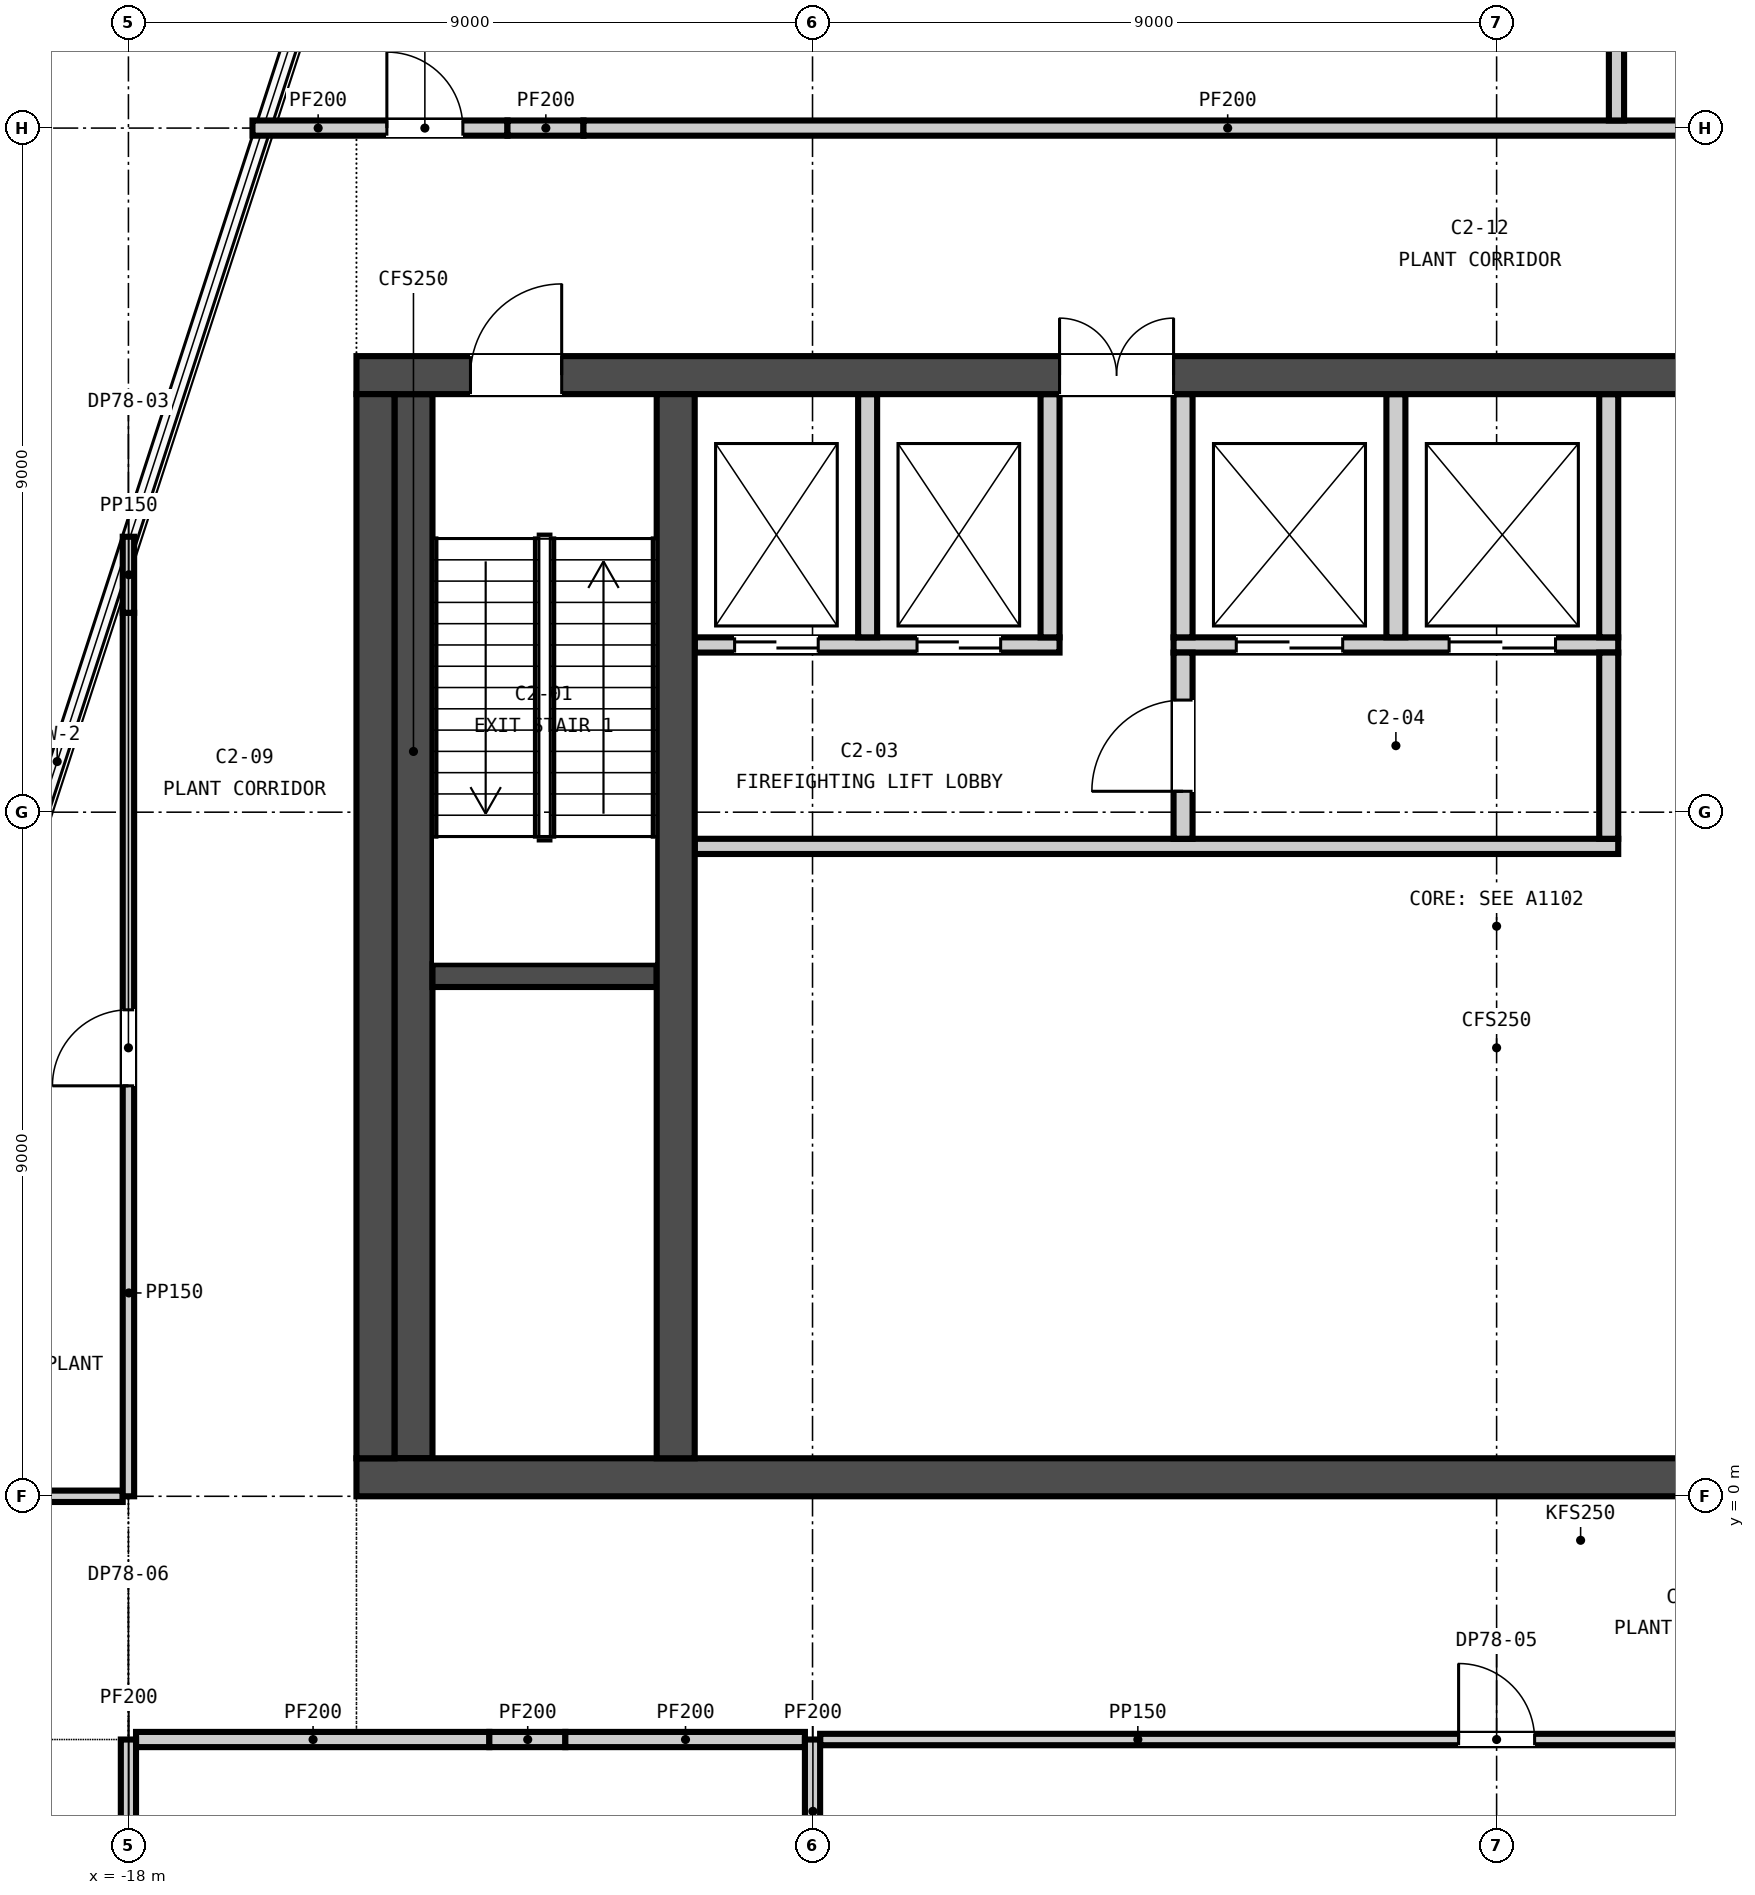
"""IFC4 building model, lengths in metres.
Left out: names, types, materials, properties, quantities, classifications, styles, units other than length and angle.
Written with IfcOpenShell. Run it as: python <this file> out.ifc"""

import sys

from ifc_helpers import new_model, si_unit, direction, frame, frame_2d, origin, place, context, subcontext, project, spatial, rectangle, extrude, element, fill, save


model = new_model("IFC4")
c1 = context("Model", 3, precision=1e-05, world=origin(), true_north=direction((0.0, 1.0)))
c2 = subcontext(c1, "Body", "Model", "MODEL_VIEW")
j1 = project(units=[si_unit("LENGTHUNIT", "METRE"), si_unit("PLANEANGLEUNIT", "RADIAN")], contexts=[c1])
p1 = place(None, origin())
s1 = spatial("IfcSite", under=j1, at=p1, CompositionType="ELEMENT")
p2 = place(p1, origin())
s2 = spatial("IfcBuilding", under=s1, at=p2, CompositionType="ELEMENT")
p3 = place(p2, frame((0.0, 0.0, 306.1)))
s3 = spatial("IfcBuildingStorey", under=s2, at=p3, CompositionType="ELEMENT", Elevation=306.1)
p4 = place(p3, frame((-15.0, 0.25, -0.25), z_axis=(0.0, 0.0, 1.0), x_axis=(1.0, 0.0, 0.0)))
e1 = element("IfcWall", 1, at=p4, inside=s3, PredefinedType="SOLIDWALL", context=c2, shape_type="SweptSolid", body=[
    extrude(rectangle(XDim=30.0, YDim=0.5, at=frame_2d((15.0, 0.0))), origin(), (0.0, 0.0, 1.0), 5.0),
])
p5 = place(p3, frame((-15.0, 14.75, -0.25), z_axis=(0.0, 0.0, 1.0), x_axis=(1.0, 0.0, 0.0)))
e2 = element("IfcWall", 2, at=p5, inside=s3, PredefinedType="SOLIDWALL", context=c2, shape_type="SweptSolid", body=[
    extrude(rectangle(XDim=30.0, YDim=0.5, at=frame_2d((15.0, 0.0))), origin(), (0.0, 0.0, 1.0), 5.0),
])
p6 = place(p5, frame((1.5, 0.0, 0.25)))
e3 = element("IfcOpeningElement", 3, at=p6, cuts=e2, PredefinedType="OPENING", context=c2, shape_type="SweptSolid", body=[
    extrude(rectangle(XDim=1.2, YDim=2.1, at=frame_2d((0.6, 1.05))), frame((0.0, 0.26, 0.0), z_axis=(0.0, -1.0, 0.0), x_axis=(1.0, 0.0, 0.0)), (0.0, 0.0, 1.0), 0.52),
])
p7 = place(p5, frame((27.3, 0.0, 0.25)))
e4 = element("IfcOpeningElement", 4, at=p7, cuts=e2, PredefinedType="OPENING", context=c2, shape_type="SweptSolid", body=[
    extrude(rectangle(XDim=1.2, YDim=2.1, at=frame_2d((0.6, 1.05))), frame((0.0, 0.26, 0.0), z_axis=(0.0, -1.0, 0.0), x_axis=(1.0, 0.0, 0.0)), (0.0, 0.0, 1.0), 0.52),
])
p8 = place(p5, frame((9.25, 0.0, 0.25)))
e5 = element("IfcOpeningElement", 5, at=p8, cuts=e2, PredefinedType="OPENING", context=c2, shape_type="SweptSolid", body=[
    extrude(rectangle(XDim=1.5, YDim=2.1, at=frame_2d((0.75, 1.05))), frame((0.0, 0.26, 0.0), z_axis=(0.0, -1.0, 0.0), x_axis=(1.0, 0.0, 0.0)), (0.0, 0.0, 1.0), 0.52),
])
for number, where, z_axis, x_axis in (
    (6, (-14.75, 0.5, -0.25), (0.0, 0.0, 1.0), (0.0, 1.0, 0.0)),
    (7, (-10.8, 0.5, -0.25), (0.0, 0.0, 1.0), (0.0, 1.0, 0.0)),
):
    element("IfcWall", number, at=place(p3, frame(where, z_axis=z_axis, x_axis=x_axis)), inside=s3, PredefinedType="SOLIDWALL", context=c2, shape_type="SweptSolid", body=[
        extrude(rectangle(XDim=14.0, YDim=0.5, at=frame_2d((7.0, 0.0))), origin(), (0.0, 0.0, 1.0), 5.0),
    ])
p9 = place(p3, frame((-14.0, 6.85, 0.0), z_axis=(0.0, 0.0, 1.0), x_axis=(1.0, 0.0, 0.0)))
e8 = element("IfcWall", 8, at=p9, inside=s3, PredefinedType="SOLIDWALL", context=c2, shape_type="SweptSolid", body=[
    extrude(rectangle(XDim=2.95, YDim=0.3, at=frame_2d((1.475, 0.0))), origin(), (0.0, 0.0, 1.0), 4.75),
])
p10 = place(p3, frame((-14.25, 0.5, 0.0), z_axis=(0.0, 0.0, 1.0), x_axis=(0.0, 1.0, 0.0)))
e9 = element("IfcWall", 9, at=p10, inside=s3, PredefinedType="SOLIDWALL", context=c2, shape_type="SweptSolid", body=[
    extrude(rectangle(XDim=14.0, YDim=0.5, at=frame_2d((7.0, 0.0))), origin(), (0.0, 0.0, 1.0), 4.75),
])
p11 = place(p3, frame((-10.55, 8.55, 0.0), z_axis=(0.0, 0.0, 1.0), x_axis=(1.0, 0.0, 0.0)))
e10 = element("IfcWall", 10, at=p11, inside=s3, PredefinedType="PARTITIONING", context=c2, shape_type="SweptSolid", body=[
    extrude(rectangle(XDim=12.15, YDim=0.2, at=frame_2d((6.075, 0.0))), origin(), (0.0, 0.0, 1.0), 4.75),
])
p12 = place(p3, frame((-10.55, 11.2, 0.0), z_axis=(0.0, 0.0, 1.0), x_axis=(1.0, 0.0, 0.0)))
e11 = element("IfcWall", 11, at=p12, inside=s3, PredefinedType="PARTITIONING", context=c2, shape_type="SweptSolid", body=[
    extrude(rectangle(XDim=4.8, YDim=0.2, at=frame_2d((2.4, 0.0))), origin(), (0.0, 0.0, 1.0), 4.75),
])
p13 = place(p12, frame((0.525, 0.0, 0.0)))
e12 = element("IfcOpeningElement", 12, at=p13, cuts=e11, PredefinedType="OPENING", context=c2, shape_type="SweptSolid", body=[
    extrude(rectangle(XDim=1.1, YDim=2.1, at=frame_2d((0.55, 1.05))), frame((0.0, 0.11, 0.0), z_axis=(0.0, -1.0, 0.0), x_axis=(1.0, 0.0, 0.0)), (0.0, 0.0, 1.0), 0.22),
])
p14 = place(p12, frame((2.925, 0.0, 0.0)))
e13 = element("IfcOpeningElement", 13, at=p14, cuts=e11, PredefinedType="OPENING", context=c2, shape_type="SweptSolid", body=[
    extrude(rectangle(XDim=1.1, YDim=2.1, at=frame_2d((0.55, 1.05))), frame((0.0, 0.11, 0.0), z_axis=(0.0, -1.0, 0.0), x_axis=(1.0, 0.0, 0.0)), (0.0, 0.0, 1.0), 0.22),
])
p15 = place(p3, frame((-4.25, 11.2, 0.0), z_axis=(0.0, 0.0, 1.0), x_axis=(1.0, 0.0, 0.0)))
e14 = element("IfcWall", 14, at=p15, inside=s3, PredefinedType="PARTITIONING", context=c2, shape_type="SweptSolid", body=[
    extrude(rectangle(XDim=5.85, YDim=0.2, at=frame_2d((2.925, 0.0))), origin(), (0.0, 0.0, 1.0), 4.75),
])
p16 = place(p15, frame((0.825, 0.0, 0.0)))
e15 = element("IfcOpeningElement", 15, at=p16, cuts=e14, PredefinedType="OPENING", context=c2, shape_type="SweptSolid", body=[
    extrude(rectangle(XDim=1.4, YDim=2.1, at=frame_2d((0.7, 1.05))), frame((0.0, 0.11, 0.0), z_axis=(0.0, -1.0, 0.0), x_axis=(1.0, 0.0, 0.0)), (0.0, 0.0, 1.0), 0.22),
])
p17 = place(p15, frame((3.625, 0.0, 0.0)))
e16 = element("IfcOpeningElement", 16, at=p17, cuts=e14, PredefinedType="OPENING", context=c2, shape_type="SweptSolid", body=[
    extrude(rectangle(XDim=1.4, YDim=2.1, at=frame_2d((0.7, 1.05))), frame((0.0, 0.11, 0.0), z_axis=(0.0, -1.0, 0.0), x_axis=(1.0, 0.0, 0.0)), (0.0, 0.0, 1.0), 0.22),
])
p18 = place(p3, frame((-4.125, 8.65, 0.0), z_axis=(0.0, 0.0, 1.0), x_axis=(0.0, 1.0, 0.0)))
e17 = element("IfcWall", 17, at=p18, inside=s3, PredefinedType="PARTITIONING", context=c2, shape_type="SweptSolid", body=[
    extrude(rectangle(XDim=2.45, YDim=0.25, at=frame_2d((1.225, 0.0))), origin(), (0.0, 0.0, 1.0), 4.75),
])
p19 = place(p18, frame((0.625, 0.0, 0.0)))
e18 = element("IfcOpeningElement", 18, at=p19, cuts=e17, PredefinedType="OPENING", context=c2, shape_type="SweptSolid", body=[
    extrude(rectangle(XDim=1.2, YDim=2.1, at=frame_2d((0.6, 1.05))), frame((0.0, 0.135, 0.0), z_axis=(0.0, -1.0, 0.0), x_axis=(1.0, 0.0, 0.0)), (0.0, 0.0, 1.0), 0.27),
])
p20 = place(p3, frame((1.475, 8.65, 0.0), z_axis=(0.0, 0.0, 1.0), x_axis=(0.0, 1.0, 0.0)))
e19 = element("IfcWall", 19, at=p20, inside=s3, PredefinedType="PARTITIONING", context=c2, shape_type="SweptSolid", body=[
    extrude(rectangle(XDim=2.45, YDim=0.25, at=frame_2d((1.225, 0.0))), origin(), (0.0, 0.0, 1.0), 4.75),
])
for number, where, z_axis, x_axis in (
    (20, (-8.275, 11.3, 0.0), (0.0, 0.0, 1.0), (0.0, 1.0, 0.0)),
    (21, (-5.875, 11.3, 0.0), (0.0, 0.0, 1.0), (0.0, 1.0, 0.0)),
    (22, (-4.125, 11.3, 0.0), (0.0, 0.0, 1.0), (0.0, 1.0, 0.0)),
    (23, (-1.325, 11.3, 0.0), (0.0, 0.0, 1.0), (0.0, 1.0, 0.0)),
    (24, (1.475, 11.3, 0.0), (0.0, 0.0, 1.0), (0.0, 1.0, 0.0)),
):
    element("IfcWall", number, at=place(p3, frame(where, z_axis=z_axis, x_axis=x_axis)), inside=s3, PredefinedType="PARTITIONING", context=c2, shape_type="SweptSolid", body=[
        extrude(rectangle(XDim=3.2, YDim=0.25, at=frame_2d((1.6, 0.0))), origin(), (0.0, 0.0, 1.0), 4.75),
    ])
p21 = place(p3, frame((-17.9, -3.2, 0.0), z_axis=(0.0, 0.0, 1.0), x_axis=(1.0, 0.0, 0.0)))
e25 = element("IfcWall", 25, at=p21, inside=s3, PredefinedType="PARTITIONING", context=c2, shape_type="SweptSolid", body=[
    extrude(rectangle(XDim=4.648, YDim=0.2, at=frame_2d((2.324, 0.0))), origin(), (0.0, 0.0, 1.0), 4.75),
])
p22 = place(p3, frame((-13.252, -3.2, 0.0), z_axis=(0.0, 0.0, 1.0), x_axis=(1.0, 0.0, 0.0)))
e26 = element("IfcWall", 26, at=p22, inside=s3, PredefinedType="PARTITIONING", context=c2, shape_type="SweptSolid", body=[
    extrude(rectangle(XDim=1.0, YDim=0.2, at=frame_2d((0.5, 0.0))), origin(), (0.0, 0.0, 1.0), 4.0),
])
p23 = place(p3, frame((-12.252, -3.2, 0.0), z_axis=(0.0, 0.0, 1.0), x_axis=(1.0, 0.0, 0.0)))
e27 = element("IfcWall", 27, at=p23, inside=s3, PredefinedType="PARTITIONING", context=c2, shape_type="SweptSolid", body=[
    extrude(rectangle(XDim=3.152, YDim=0.2, at=frame_2d((1.576, 0.0))), origin(), (0.0, 0.0, 1.0), 4.75),
])
p24 = place(p3, frame((-8.9, -3.2, 0.0), z_axis=(0.0, 0.0, 1.0), x_axis=(1.0, 0.0, 0.0)))
e28 = element("IfcWall", 28, at=p24, inside=s3, PredefinedType="PARTITIONING", context=c2, shape_type="SweptSolid", body=[
    extrude(rectangle(XDim=17.8, YDim=0.15, at=frame_2d((8.9, 0.0))), origin(), (0.0, 0.0, 1.0), 4.75),
])
p25 = place(p24, frame((8.4, 0.0, 0.0)))
e29 = element("IfcOpeningElement", 29, at=p25, cuts=e28, PredefinedType="OPENING", context=c2, shape_type="SweptSolid", body=[
    extrude(rectangle(XDim=1.0, YDim=2.1, at=frame_2d((0.5, 1.05))), frame((0.0, 0.085, 0.0), z_axis=(0.0, -1.0, 0.0), x_axis=(1.0, 0.0, 0.0)), (0.0, 0.0, 1.0), 0.17),
])
p26 = place(p3, frame((-22.216, 0.0, 0.0), z_axis=(0.0, 0.0, 1.0), x_axis=(1.0, 0.0, 0.0)))
e30 = element("IfcWall", 30, at=p26, inside=s3, PredefinedType="PARTITIONING", context=c2, shape_type="SweptSolid", body=[
    extrude(rectangle(XDim=4.141, YDim=0.15, at=frame_2d((2.071, 0.0))), origin(), (0.0, 0.0, 1.0), 4.75),
])
p27 = place(p3, frame((-16.368, 18.0, 0.0), z_axis=(0.0, 0.0, 1.0), x_axis=(1.0, 0.0, 0.0)))
e31 = element("IfcWall", 31, at=p27, inside=s3, PredefinedType="PARTITIONING", context=c2, shape_type="SweptSolid", body=[
    extrude(rectangle(XDim=3.354, YDim=0.2, at=frame_2d((1.677, 0.0))), origin(), (0.0, 0.0, 1.0), 4.75),
])
p28 = place(p27, frame((1.768, 0.0, 0.0)))
e32 = element("IfcOpeningElement", 32, at=p28, cuts=e31, PredefinedType="OPENING", context=c2, shape_type="SweptSolid", body=[
    extrude(rectangle(XDim=1.0, YDim=2.1, at=frame_2d((0.5, 1.05))), frame((0.0, 0.11, 0.0), z_axis=(0.0, -1.0, 0.0), x_axis=(1.0, 0.0, 0.0)), (0.0, 0.0, 1.0), 0.22),
])
p29 = place(p3, frame((-13.013, 18.0, 0.0), z_axis=(0.0, 0.0, 1.0), x_axis=(1.0, 0.0, 0.0)))
e33 = element("IfcWall", 33, at=p29, inside=s3, PredefinedType="PARTITIONING", context=c2, shape_type="SweptSolid", body=[
    extrude(rectangle(XDim=1.0, YDim=0.2, at=frame_2d((0.5, 0.0))), origin(), (0.0, 0.0, 1.0), 4.15),
])
p30 = place(p3, frame((-12.013, 18.0, 0.0), z_axis=(0.0, 0.0, 1.0), x_axis=(1.0, 0.0, 0.0)))
e34 = element("IfcWall", 34, at=p30, inside=s3, PredefinedType="PARTITIONING", context=c2, shape_type="SweptSolid", body=[
    extrude(rectangle(XDim=21.42, YDim=0.2, at=frame_2d((10.71, 0.0))), origin(), (0.0, 0.0, 1.0), 4.75),
])
p31 = place(p30, frame((16.991, 0.0, 0.0)))
e35 = element("IfcOpeningElement", 35, at=p31, cuts=e34, PredefinedType="OPENING", context=c2, shape_type="SweptSolid", body=[
    extrude(rectangle(XDim=1.0, YDim=2.1, at=frame_2d((0.5, 1.05))), frame((0.0, 0.11, 0.0), z_axis=(0.0, -1.0, 0.0), x_axis=(1.0, 0.0, 0.0)), (0.0, 0.0, 1.0), 0.22),
])
p32 = place(p3, frame((-18.0, -7.104, 0.0), z_axis=(0.0, 0.0, 1.0), x_axis=(0.0, 1.0, 0.0)))
e36 = element("IfcWall", 36, at=p32, inside=s3, PredefinedType="PARTITIONING", context=c2, shape_type="SweptSolid", body=[
    extrude(rectangle(XDim=3.904, YDim=0.2, at=frame_2d((1.952, 0.0))), origin(), (0.0, 0.0, 1.0), 4.75),
])
p33 = place(p3, frame((-18.0, 0.0, 0.0), z_axis=(0.0, 0.0, 1.0), x_axis=(0.0, 1.0, 0.0)))
e37 = element("IfcWall", 37, at=p33, inside=s3, PredefinedType="PARTITIONING", context=c2, shape_type="SweptSolid", body=[
    extrude(rectangle(XDim=11.624, YDim=0.15, at=frame_2d((5.812, 0.0))), origin(), (0.0, 0.0, 1.0), 4.75),
])
p34 = place(p33, frame((5.4, 0.0, 0.0)))
e38 = element("IfcOpeningElement", 38, at=p34, cuts=e37, PredefinedType="OPENING", context=c2, shape_type="SweptSolid", body=[
    extrude(rectangle(XDim=1.0, YDim=2.1, at=frame_2d((0.5, 1.05))), frame((0.0, 0.085, 0.0), z_axis=(0.0, -1.0, 0.0), x_axis=(1.0, 0.0, 0.0)), (0.0, 0.0, 1.0), 0.17),
])
p35 = place(p3, frame((-18.0, 11.624, 0.0), z_axis=(0.0, 0.0, 1.0), x_axis=(0.0, 1.0, 0.0)))
e39 = element("IfcWall", 39, at=p35, inside=s3, PredefinedType="PARTITIONING", context=c2, shape_type="SweptSolid", body=[
    extrude(rectangle(XDim=1.0, YDim=0.15, at=frame_2d((0.5, 0.0))), origin(), (0.0, 0.0, 1.0), 4.134),
])
p36 = place(p3, frame((-9.0, -5.089, 0.0), z_axis=(0.0, 0.0, 1.0), x_axis=(0.0, 1.0, 0.0)))
e40 = element("IfcWall", 40, at=p36, inside=s3, PredefinedType="PARTITIONING", context=c2, shape_type="SweptSolid", body=[
    extrude(rectangle(XDim=1.889, YDim=0.2, at=frame_2d((0.945, 0.0))), origin(), (0.0, 0.0, 1.0), 4.0),
])
p37 = place(p3, frame((1.577, 18.1, 0.0), z_axis=(0.0, 0.0, 1.0), x_axis=(0.0, 1.0, 0.0)))
e41 = element("IfcWall", 41, at=p37, inside=s3, PredefinedType="PARTITIONING", context=c2, shape_type="SweptSolid", body=[
    extrude(rectangle(XDim=3.54, YDim=0.2, at=frame_2d((1.77, 0.0))), origin(), (0.0, 0.0, 1.0), 4.75),
])
p38 = place(p6, origin())
e42 = element("IfcDoor", 42, at=p38, inside=s3, OperationType="SINGLE_SWING_RIGHT", PredefinedType="DOOR", context=c2, shape_type="SweptSolid", body=[
    extrude(rectangle(XDim=1.2, YDim=2.1, at=frame_2d((0.6, 1.05))), frame((0.0, 0.025, 0.0), z_axis=(0.0, -1.0, 0.0), x_axis=(1.0, 0.0, 0.0)), (0.0, 0.0, 1.0), 0.05),
])
fill(e3, e42)
p39 = place(p19, origin())
e43 = element("IfcDoor", 43, at=p39, inside=s3, OperationType="SINGLE_SWING_LEFT", PredefinedType="DOOR", context=c2, shape_type="SweptSolid", body=[
    extrude(rectangle(XDim=1.2, YDim=2.1, at=frame_2d((0.6, 1.05))), frame((0.0, 0.025, 0.0), z_axis=(0.0, -1.0, 0.0), x_axis=(1.0, 0.0, 0.0)), (0.0, 0.0, 1.0), 0.05),
])
fill(e18, e43)
p40 = place(p13, origin())
e44 = element("IfcDoor", 44, at=p40, inside=s3, OperationType="DOUBLE_DOOR_SLIDING", PredefinedType="DOOR", context=c2, shape_type="SweptSolid", body=[
    extrude(rectangle(XDim=1.1, YDim=2.1, at=frame_2d((0.55, 1.05))), frame((0.0, 0.025, 0.0), z_axis=(0.0, -1.0, 0.0), x_axis=(1.0, 0.0, 0.0)), (0.0, 0.0, 1.0), 0.05),
])
fill(e12, e44)
p41 = place(p14, origin())
e45 = element("IfcDoor", 45, at=p41, inside=s3, OperationType="DOUBLE_DOOR_SLIDING", PredefinedType="DOOR", context=c2, shape_type="SweptSolid", body=[
    extrude(rectangle(XDim=1.1, YDim=2.1, at=frame_2d((0.55, 1.05))), frame((0.0, 0.025, 0.0), z_axis=(0.0, -1.0, 0.0), x_axis=(1.0, 0.0, 0.0)), (0.0, 0.0, 1.0), 0.05),
])
fill(e13, e45)
p42 = place(p16, origin())
e46 = element("IfcDoor", 46, at=p42, inside=s3, OperationType="DOUBLE_DOOR_SLIDING", PredefinedType="DOOR", context=c2, shape_type="SweptSolid", body=[
    extrude(rectangle(XDim=1.4, YDim=2.1, at=frame_2d((0.7, 1.05))), frame((0.0, 0.025, 0.0), z_axis=(0.0, -1.0, 0.0), x_axis=(1.0, 0.0, 0.0)), (0.0, 0.0, 1.0), 0.05),
])
fill(e15, e46)
p43 = place(p17, origin())
e47 = element("IfcDoor", 47, at=p43, inside=s3, OperationType="DOUBLE_DOOR_SLIDING", PredefinedType="DOOR", context=c2, shape_type="SweptSolid", body=[
    extrude(rectangle(XDim=1.4, YDim=2.1, at=frame_2d((0.7, 1.05))), frame((0.0, 0.025, 0.0), z_axis=(0.0, -1.0, 0.0), x_axis=(1.0, 0.0, 0.0)), (0.0, 0.0, 1.0), 0.05),
])
fill(e16, e47)
p44 = place(p8, origin())
e48 = element("IfcDoor", 48, at=p44, inside=s3, OperationType="DOUBLE_DOOR_SINGLE_SWING", PredefinedType="DOOR", context=c2, shape_type="SweptSolid", body=[
    extrude(rectangle(XDim=1.5, YDim=2.1, at=frame_2d((0.75, 1.05))), frame((0.0, 0.025, 0.0), z_axis=(0.0, -1.0, 0.0), x_axis=(1.0, 0.0, 0.0)), (0.0, 0.0, 1.0), 0.05),
])
fill(e5, e48)
p45 = place(p28, origin())
e49 = element("IfcDoor", 49, at=p45, inside=s3, OperationType="SINGLE_SWING_LEFT", PredefinedType="DOOR", context=c2, shape_type="SweptSolid", body=[
    extrude(rectangle(XDim=1.0, YDim=2.1, at=frame_2d((0.5, 1.05))), frame((0.0, 0.025, 0.0), z_axis=(0.0, -1.0, 0.0), x_axis=(1.0, 0.0, 0.0)), (0.0, 0.0, 1.0), 0.05),
])
fill(e32, e49)
p46 = place(p34, origin())
e50 = element("IfcDoor", 50, at=p46, inside=s3, OperationType="SINGLE_SWING_LEFT", PredefinedType="DOOR", context=c2, shape_type="SweptSolid", body=[
    extrude(rectangle(XDim=1.0, YDim=2.1, at=frame_2d((0.5, 1.05))), frame((0.0, 0.025, 0.0), z_axis=(0.0, -1.0, 0.0), x_axis=(1.0, 0.0, 0.0)), (0.0, 0.0, 1.0), 0.05),
])
fill(e38, e50)
p47 = place(p25, origin())
e51 = element("IfcDoor", 51, at=p47, inside=s3, OperationType="SINGLE_SWING_LEFT", PredefinedType="DOOR", context=c2, shape_type="SweptSolid", body=[
    extrude(rectangle(XDim=1.0, YDim=2.1, at=frame_2d((0.5, 1.05))), frame((0.0, 0.025, 0.0), z_axis=(0.0, -1.0, 0.0), x_axis=(1.0, 0.0, 0.0)), (0.0, 0.0, 1.0), 0.05),
])
fill(e29, e51)
save(model, sys.argv[1])
